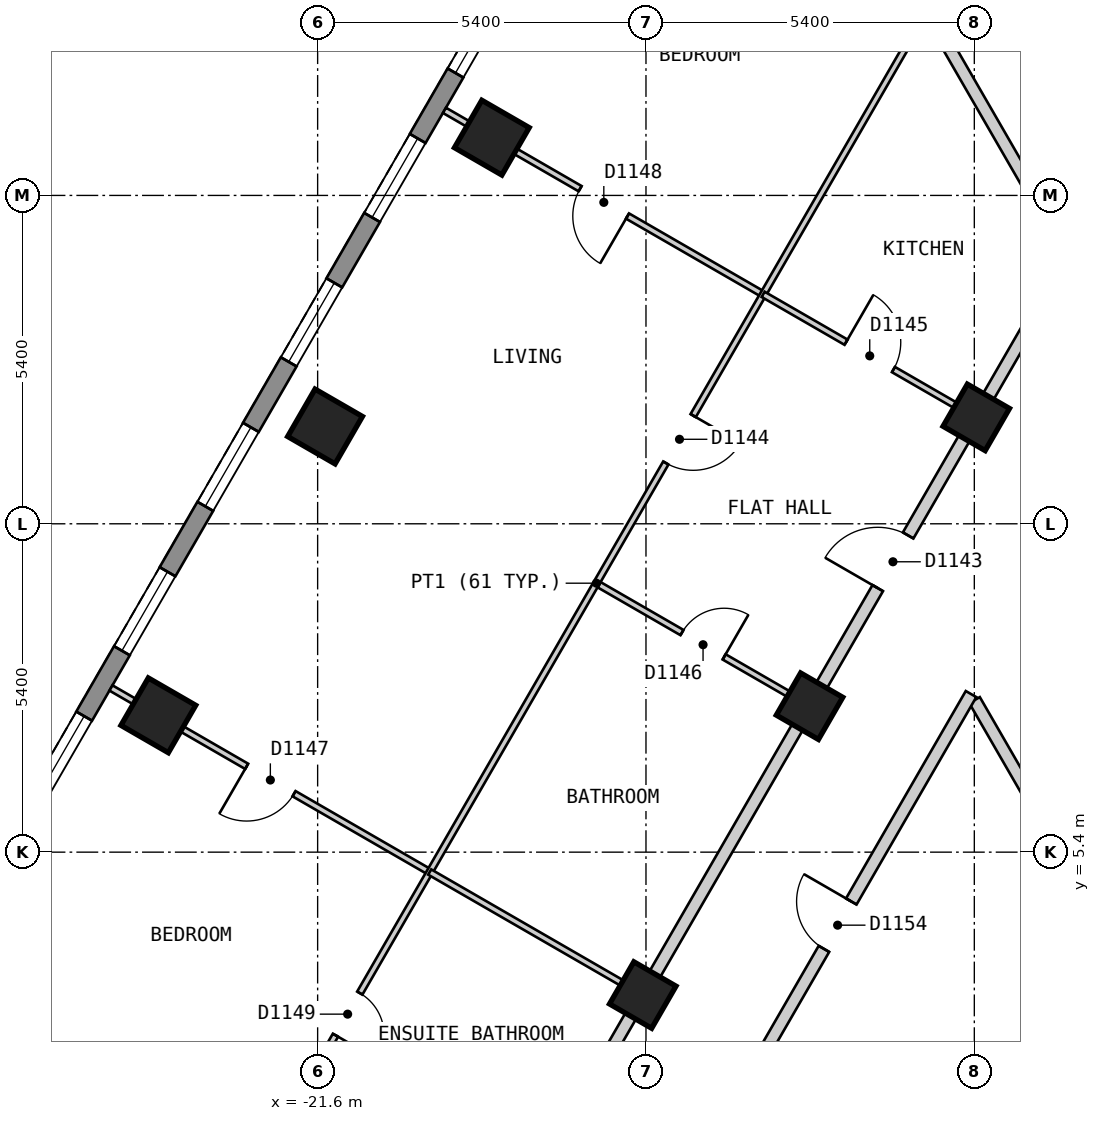
"""IFC4 building model, lengths in metres.
Left out: names, types, materials, properties, quantities, classifications, styles, units other than length and angle.
Written with IfcOpenShell. Run it as: python <this file> out.ifc"""

import sys

from ifc_helpers import new_model, si_unit, direction, frame, frame_2d, origin, origin_2d, place, context, subcontext, project, spatial, polyline, rectangle, outline, extrude, element, fill, save


model = new_model("IFC4")
c1 = context("Model", 3, precision=1e-05, world=origin(), true_north=direction((0.0, 1.0)))
c2 = subcontext(c1, "Body", "Model", "MODEL_VIEW")
j1 = project(units=[si_unit("LENGTHUNIT", "METRE"), si_unit("PLANEANGLEUNIT", "RADIAN")], contexts=[c1])
p1 = place(None, origin())
s1 = spatial("IfcSite", under=j1, at=p1, CompositionType="ELEMENT")
p2 = place(p1, origin())
s2 = spatial("IfcBuilding", under=s1, at=p2, CompositionType="ELEMENT")
p3 = place(p2, frame((0.0, 0.0, 150.6)))
s3 = spatial("IfcBuildingStorey", under=s2, at=p3, CompositionType="ELEMENT", Elevation=150.6)
for number, where, z_axis, x_axis in (
    (1, (-18.735, 17.15, 0.0), (0.0, 0.0, 1.0), (-0.5, -0.866, 0.0)),
    (2, (-21.478, 12.4, 0.0), (0.0, 0.0, 1.0), (-0.5, -0.866, 0.0)),
    (3, (-24.22, 7.65, 0.0), (0.0, 0.0, 1.0), (-0.5, -0.866, 0.0)),
):
    element("IfcColumn", number, at=place(p3, frame(where, z_axis=z_axis, x_axis=x_axis)), inside=s3, PredefinedType="COLUMN", context=c2, shape_type="SweptSolid", body=[
        extrude(rectangle(XDim=0.9, YDim=0.9, at=origin_2d()), origin(), (0.0, 0.0, 1.0), 3.0),
    ])
for number, where, z_axis, x_axis in (
    (4, (-10.768, 12.55, 0.0), (0.0, 0.0, 1.0), (-0.5, -0.866, 0.0)),
    (5, (-13.51, 7.8, 0.0), (0.0, 0.0, 1.0), (-0.5, -0.866, 0.0)),
    (6, (-16.253, 3.05, 0.0), (0.0, 0.0, 1.0), (-0.5, -0.866, 0.0)),
):
    element("IfcColumn", number, at=place(p3, frame(where, z_axis=z_axis, x_axis=x_axis)), inside=s3, PredefinedType="COLUMN", context=c2, shape_type="SweptSolid", body=[
        extrude(rectangle(XDim=0.8, YDim=0.8, at=origin_2d()), origin(), (0.0, 0.0, 1.0), 3.0),
    ])
p4 = place(p3, frame((-16.555, 23.025, 0.0), z_axis=(0.0, 0.0, 1.0), x_axis=(-0.500020536353, -0.866013546791, 0.0)))
e7 = element("IfcWall", 7, at=p4, inside=s3, PredefinedType="SOLIDWALL", context=c2, shape_type="SweptSolid", body=[
    extrude(outline(polyline([(0.0, -0.15), (23.325, -0.15), (23.245, 0.15), (0.08, 0.15), (0.0, -0.15)])), origin(), (0.0, 0.0, 1.0), 2.6),
])
p5 = place(p4, frame((1.314, 0.0, 0.15)))
e8 = element("IfcOpeningElement", 8, at=p5, cuts=e7, PredefinedType="OPENING", context=c2, shape_type="SweptSolid", body=[
    extrude(rectangle(XDim=1.5, YDim=2.1, at=frame_2d((0.75, 1.05))), frame((0.0, 0.16, 0.0), z_axis=(0.0, -1.0, 0.0), x_axis=(1.0, 0.0, 0.0)), (0.0, 0.0, 1.0), 0.32),
])
p6 = place(p4, frame((4.056, 0.0, 0.15)))
e9 = element("IfcOpeningElement", 9, at=p6, cuts=e7, PredefinedType="OPENING", context=c2, shape_type="SweptSolid", body=[
    extrude(rectangle(XDim=1.5, YDim=2.1, at=frame_2d((0.75, 1.05))), frame((0.0, 0.16, 0.0), z_axis=(0.0, -1.0, 0.0), x_axis=(1.0, 0.0, 0.0)), (0.0, 0.0, 1.0), 0.32),
])
p7 = place(p4, frame((6.799, 0.0, 0.15)))
e10 = element("IfcOpeningElement", 10, at=p7, cuts=e7, PredefinedType="OPENING", context=c2, shape_type="SweptSolid", body=[
    extrude(rectangle(XDim=1.5, YDim=2.1, at=frame_2d((0.75, 1.05))), frame((0.0, 0.16, 0.0), z_axis=(0.0, -1.0, 0.0), x_axis=(1.0, 0.0, 0.0)), (0.0, 0.0, 1.0), 0.32),
])
p8 = place(p4, frame((9.541, 0.0, 0.15)))
e11 = element("IfcOpeningElement", 11, at=p8, cuts=e7, PredefinedType="OPENING", context=c2, shape_type="SweptSolid", body=[
    extrude(rectangle(XDim=1.5, YDim=2.1, at=frame_2d((0.75, 1.05))), frame((0.0, 0.16, 0.0), z_axis=(0.0, -1.0, 0.0), x_axis=(1.0, 0.0, 0.0)), (0.0, 0.0, 1.0), 0.32),
])
p9 = place(p4, frame((12.285, 0.0, 0.15)))
e12 = element("IfcOpeningElement", 12, at=p9, cuts=e7, PredefinedType="OPENING", context=c2, shape_type="SweptSolid", body=[
    extrude(rectangle(XDim=1.5, YDim=2.1, at=frame_2d((0.75, 1.05))), frame((0.0, 0.16, 0.0), z_axis=(0.0, -1.0, 0.0), x_axis=(1.0, 0.0, 0.0)), (0.0, 0.0, 1.0), 0.32),
])
p10 = place(p4, frame((15.027, 0.0, 0.15)))
e13 = element("IfcOpeningElement", 13, at=p10, cuts=e7, PredefinedType="OPENING", context=c2, shape_type="SweptSolid", body=[
    extrude(rectangle(XDim=1.5, YDim=2.1, at=frame_2d((0.75, 1.05))), frame((0.0, 0.16, 0.0), z_axis=(0.0, -1.0, 0.0), x_axis=(1.0, 0.0, 0.0)), (0.0, 0.0, 1.0), 0.32),
])
p11 = place(p4, frame((17.769, 0.0, 0.15)))
e14 = element("IfcOpeningElement", 14, at=p11, cuts=e7, PredefinedType="OPENING", context=c2, shape_type="SweptSolid", body=[
    extrude(rectangle(XDim=1.5, YDim=2.1, at=frame_2d((0.75, 1.05))), frame((0.0, 0.16, 0.0), z_axis=(0.0, -1.0, 0.0), x_axis=(1.0, 0.0, 0.0)), (0.0, 0.0, 1.0), 0.32),
])
p12 = place(p4, frame((20.512, 0.0, 0.15)))
e15 = element("IfcOpeningElement", 15, at=p12, cuts=e7, PredefinedType="OPENING", context=c2, shape_type="SweptSolid", body=[
    extrude(rectangle(XDim=1.5, YDim=2.1, at=frame_2d((0.75, 1.05))), frame((0.0, 0.16, 0.0), z_axis=(0.0, -1.0, 0.0), x_axis=(1.0, 0.0, 0.0)), (0.0, 0.0, 1.0), 0.32),
])
p13 = place(p3, frame((-10.796, 7.9, 0.0), z_axis=(0.0, 0.0, 1.0), x_axis=(0.499954271211, -0.866051803703, 0.0)))
e16 = element("IfcWall", 16, at=p13, inside=s3, PredefinedType="PARTITIONING", context=c2, shape_type="SweptSolid", body=[
    extrude(rectangle(XDim=7.536, YDim=0.2, at=frame_2d((3.768, 0.0))), origin(), (0.0, 0.0, 1.0), 2.6),
])
p14 = place(p3, frame((-15.242, 0.399, 0.0), z_axis=(0.0, 0.0, 1.0), x_axis=(0.499953615651, 0.866052182145, 0.0)))
e17 = element("IfcWall", 17, at=p14, inside=s3, PredefinedType="PARTITIONING", context=c2, shape_type="SweptSolid", body=[
    extrude(rectangle(XDim=8.777, YDim=0.2, at=frame_2d((4.388, 0.0))), origin(), (0.0, 0.0, 1.0), 2.6),
])
p15 = place(p14, frame((3.938, 0.0, 0.0)))
e18 = element("IfcOpeningElement", 18, at=p15, cuts=e17, PredefinedType="OPENING", context=c2, shape_type="SweptSolid", body=[
    extrude(rectangle(XDim=0.9, YDim=2.1, at=frame_2d((0.45, 1.05))), frame((0.0, 0.11, 0.0), z_axis=(0.0, -1.0, 0.0), x_axis=(1.0, 0.0, 0.0)), (0.0, 0.0, 1.0), 0.22),
])
p16 = place(p3, frame((-17.724, 0.5, 0.0), z_axis=(0.0, 0.0, 1.0), x_axis=(0.499992388462, 0.866029798263, 0.0)))
e19 = element("IfcWall", 19, at=p16, inside=s3, PredefinedType="PARTITIONING", context=c2, shape_type="SweptSolid", body=[
    extrude(rectangle(XDim=16.859, YDim=0.2, at=frame_2d((8.429, 0.0))), origin(), (0.0, 0.0, 1.0), 2.6),
])
p17 = place(p16, frame((10.672, 0.0, 0.0)))
e20 = element("IfcOpeningElement", 20, at=p17, cuts=e19, PredefinedType="OPENING", context=c2, shape_type="SweptSolid", body=[
    extrude(rectangle(XDim=1.0, YDim=2.1, at=frame_2d((0.5, 1.05))), frame((0.0, 0.11, 0.0), z_axis=(0.0, -1.0, 0.0), x_axis=(1.0, 0.0, 0.0)), (0.0, 0.0, 1.0), 0.22),
])
p18 = place(p3, frame((-24.999, 8.1, 0.0), z_axis=(0.0, 0.0, 1.0), x_axis=(0.865978029808, -0.500082045158, 0.0)))
e21 = element("IfcWall", 21, at=p18, inside=s3, PredefinedType="PARTITIONING", context=c2, shape_type="SweptSolid", body=[
    extrude(rectangle(XDim=6.053, YDim=0.1, at=frame_2d((3.027, 0.0))), origin(), (0.0, 0.0, 1.0), 2.6),
])
p19 = place(p18, frame((2.577, 0.0, 0.0)))
e22 = element("IfcOpeningElement", 22, at=p19, cuts=e21, PredefinedType="OPENING", context=c2, shape_type="SweptSolid", body=[
    extrude(rectangle(XDim=0.9, YDim=2.1, at=frame_2d((0.45, 1.05))), frame((0.0, 0.06, 0.0), z_axis=(0.0, -1.0, 0.0), x_axis=(1.0, 0.0, 0.0)), (0.0, 0.0, 1.0), 0.12),
])
p20 = place(p3, frame((-16.971, 9.798, 0.0), z_axis=(0.0, 0.0, 1.0), x_axis=(0.866087525071, -0.499892387336, 0.0)))
e23 = element("IfcWall", 23, at=p20, inside=s3, PredefinedType="PARTITIONING", context=c2, shape_type="SweptSolid", body=[
    extrude(rectangle(XDim=3.897, YDim=0.1, at=frame_2d((1.948, 0.0))), origin(), (0.0, 0.0, 1.0), 2.6),
])
p21 = place(p20, frame((1.574, 0.0, 0.0)))
e24 = element("IfcOpeningElement", 24, at=p21, cuts=e23, PredefinedType="OPENING", context=c2, shape_type="SweptSolid", body=[
    extrude(rectangle(XDim=0.8, YDim=2.1, at=frame_2d((0.4, 1.05))), frame((0.0, 0.06, 0.0), z_axis=(0.0, -1.0, 0.0), x_axis=(1.0, 0.0, 0.0)), (0.0, 0.0, 1.0), 0.12),
])
p22 = place(p3, frame((-19.514, 17.599, 0.0), z_axis=(0.0, 0.0, 1.0), x_axis=(0.866007554612, -0.500030914399, 0.0)))
e25 = element("IfcWall", 25, at=p22, inside=s3, PredefinedType="PARTITIONING", context=c2, shape_type="SweptSolid", body=[
    extrude(rectangle(XDim=6.052, YDim=0.1, at=frame_2d((3.026, 0.0))), origin(), (0.0, 0.0, 1.0), 2.6),
])
p23 = place(p22, frame((2.576, 0.0, 0.0)))
e26 = element("IfcOpeningElement", 26, at=p23, cuts=e25, PredefinedType="OPENING", context=c2, shape_type="SweptSolid", body=[
    extrude(rectangle(XDim=0.9, YDim=2.1, at=frame_2d((0.45, 1.05))), frame((0.0, 0.06, 0.0), z_axis=(0.0, -1.0, 0.0), x_axis=(1.0, 0.0, 0.0)), (0.0, 0.0, 1.0), 0.12),
])
p24 = place(p3, frame((-22.398, 0.499, 0.0), z_axis=(0.0, 0.0, 1.0), x_axis=(0.499981561717, 0.866036048871, 0.0)))
e27 = element("IfcWall", 27, at=p24, inside=s3, PredefinedType="PARTITIONING", context=c2, shape_type="SweptSolid", body=[
    extrude(rectangle(XDim=21.532, YDim=0.1, at=frame_2d((10.766, 0.0))), origin(), (0.0, 0.0, 1.0), 2.6),
])
p25 = place(p24, frame((13.049, 0.0, 0.0)))
e28 = element("IfcOpeningElement", 28, at=p25, cuts=e27, PredefinedType="OPENING", context=c2, shape_type="SweptSolid", body=[
    extrude(rectangle(XDim=0.9, YDim=2.1, at=frame_2d((0.45, 1.05))), frame((0.0, 0.06, 0.0), z_axis=(0.0, -1.0, 0.0), x_axis=(1.0, 0.0, 0.0)), (0.0, 0.0, 1.0), 0.12),
])
p26 = place(p24, frame((2.183, 0.0, 0.0)))
e29 = element("IfcOpeningElement", 29, at=p26, cuts=e27, PredefinedType="OPENING", context=c2, shape_type="SweptSolid", body=[
    extrude(rectangle(XDim=0.8, YDim=2.1, at=frame_2d((0.4, 1.05))), frame((0.0, 0.06, 0.0), z_axis=(0.0, -1.0, 0.0), x_axis=(1.0, 0.0, 0.0)), (0.0, 0.0, 1.0), 0.12),
])
p27 = place(p3, frame((-11.52, 19.155, 0.0), z_axis=(0.0, 0.0, 1.0), x_axis=(0.499916824138, -0.866073420066, 0.0)))
e30 = element("IfcWall", 30, at=p27, inside=s3, PredefinedType="PARTITIONING", context=c2, shape_type="SweptSolid", body=[
    extrude(rectangle(XDim=4.567, YDim=0.2, at=frame_2d((2.283, 0.0))), origin(), (0.0, 0.0, 1.0), 2.6),
])
p28 = place(p3, frame((-19.757, 5.073, 0.0), z_axis=(0.0, 0.0, 1.0), x_axis=(0.866076396086, -0.499911668341, 0.0)))
e31 = element("IfcWall", 31, at=p28, inside=s3, PredefinedType="PARTITIONING", context=c2, shape_type="SweptSolid", body=[
    extrude(rectangle(XDim=3.947, YDim=0.1, at=frame_2d((1.973, 0.0))), origin(), (0.0, 0.0, 1.0), 2.6),
])
p29 = place(p3, frame((-14.273, 14.573, 0.0), z_axis=(0.0, 0.0, 1.0), x_axis=(0.866138216955, -0.499804550929, 0.0)))
e32 = element("IfcWall", 32, at=p29, inside=s3, PredefinedType="PARTITIONING", context=c2, shape_type="SweptSolid", body=[
    extrude(rectangle(XDim=3.947, YDim=0.1, at=frame_2d((1.974, 0.0))), origin(), (0.0, 0.0, 1.0), 2.6),
])
p30 = place(p29, frame((1.574, 0.0, 0.0)))
e33 = element("IfcOpeningElement", 33, at=p30, cuts=e32, PredefinedType="OPENING", context=c2, shape_type="SweptSolid", body=[
    extrude(rectangle(XDim=0.9, YDim=2.1, at=frame_2d((0.45, 1.05))), frame((0.0, 0.06, 0.0), z_axis=(0.0, -1.0, 0.0), x_axis=(1.0, 0.0, 0.0)), (0.0, 0.0, 1.0), 0.12),
])
p31 = place(p6, origin())
e34 = element("IfcWindow", 34, at=p31, inside=s3, PartitioningType="SINGLE_PANEL", PredefinedType="WINDOW", context=c2, shape_type="SweptSolid", body=[
    extrude(rectangle(XDim=1.5, YDim=2.1, at=frame_2d((0.75, 1.05))), frame((0.0, 0.03, 0.0), z_axis=(0.0, -1.0, 0.0), x_axis=(1.0, 0.0, 0.0)), (0.0, 0.0, 1.0), 0.06),
])
fill(e9, e34)
p32 = place(p7, origin())
e35 = element("IfcWindow", 35, at=p32, inside=s3, PartitioningType="SINGLE_PANEL", PredefinedType="WINDOW", context=c2, shape_type="SweptSolid", body=[
    extrude(rectangle(XDim=1.5, YDim=2.1, at=frame_2d((0.75, 1.05))), frame((0.0, 0.03, 0.0), z_axis=(0.0, -1.0, 0.0), x_axis=(1.0, 0.0, 0.0)), (0.0, 0.0, 1.0), 0.06),
])
fill(e10, e35)
p33 = place(p8, origin())
e36 = element("IfcWindow", 36, at=p33, inside=s3, PartitioningType="SINGLE_PANEL", PredefinedType="WINDOW", context=c2, shape_type="SweptSolid", body=[
    extrude(rectangle(XDim=1.5, YDim=2.1, at=frame_2d((0.75, 1.05))), frame((0.0, 0.03, 0.0), z_axis=(0.0, -1.0, 0.0), x_axis=(1.0, 0.0, 0.0)), (0.0, 0.0, 1.0), 0.06),
])
fill(e11, e36)
p34 = place(p9, origin())
e37 = element("IfcWindow", 37, at=p34, inside=s3, PartitioningType="SINGLE_PANEL", PredefinedType="WINDOW", context=c2, shape_type="SweptSolid", body=[
    extrude(rectangle(XDim=1.5, YDim=2.1, at=frame_2d((0.75, 1.05))), frame((0.0, 0.03, 0.0), z_axis=(0.0, -1.0, 0.0), x_axis=(1.0, 0.0, 0.0)), (0.0, 0.0, 1.0), 0.06),
])
fill(e12, e37)
p35 = place(p10, origin())
e38 = element("IfcWindow", 38, at=p35, inside=s3, PartitioningType="SINGLE_PANEL", PredefinedType="WINDOW", context=c2, shape_type="SweptSolid", body=[
    extrude(rectangle(XDim=1.5, YDim=2.1, at=frame_2d((0.75, 1.05))), frame((0.0, 0.03, 0.0), z_axis=(0.0, -1.0, 0.0), x_axis=(1.0, 0.0, 0.0)), (0.0, 0.0, 1.0), 0.06),
])
fill(e13, e38)
p36 = place(p11, origin())
e39 = element("IfcWindow", 39, at=p36, inside=s3, PartitioningType="SINGLE_PANEL", PredefinedType="WINDOW", context=c2, shape_type="SweptSolid", body=[
    extrude(rectangle(XDim=1.5, YDim=2.1, at=frame_2d((0.75, 1.05))), frame((0.0, 0.03, 0.0), z_axis=(0.0, -1.0, 0.0), x_axis=(1.0, 0.0, 0.0)), (0.0, 0.0, 1.0), 0.06),
])
fill(e14, e39)
p37 = place(p17, origin())
e40 = element("IfcDoor", 40, at=p37, inside=s3, OperationType="SINGLE_SWING_LEFT", PredefinedType="DOOR", context=c2, shape_type="SweptSolid", body=[
    extrude(rectangle(XDim=1.0, YDim=2.1, at=frame_2d((0.5, 1.05))), frame((0.0, 0.025, 0.0), z_axis=(0.0, -1.0, 0.0), x_axis=(1.0, 0.0, 0.0)), (0.0, 0.0, 1.0), 0.05),
])
fill(e20, e40)
p38 = place(p25, origin())
e41 = element("IfcDoor", 41, at=p38, inside=s3, OperationType="SINGLE_SWING_RIGHT", PredefinedType="DOOR", context=c2, shape_type="SweptSolid", body=[
    extrude(rectangle(XDim=0.9, YDim=2.1, at=frame_2d((0.45, 1.05))), frame((0.0, 0.025, 0.0), z_axis=(0.0, -1.0, 0.0), x_axis=(1.0, 0.0, 0.0)), (0.0, 0.0, 1.0), 0.05),
])
fill(e28, e41)
p39 = place(p30, origin())
e42 = element("IfcDoor", 42, at=p39, inside=s3, OperationType="SINGLE_SWING_LEFT", PredefinedType="DOOR", context=c2, shape_type="SweptSolid", body=[
    extrude(rectangle(XDim=0.9, YDim=2.1, at=frame_2d((0.45, 1.05))), frame((0.0, 0.025, 0.0), z_axis=(0.0, -1.0, 0.0), x_axis=(1.0, 0.0, 0.0)), (0.0, 0.0, 1.0), 0.05),
])
fill(e33, e42)
p40 = place(p21, origin())
e43 = element("IfcDoor", 43, at=p40, inside=s3, OperationType="SINGLE_SWING_RIGHT", PredefinedType="DOOR", context=c2, shape_type="SweptSolid", body=[
    extrude(rectangle(XDim=0.8, YDim=2.1, at=frame_2d((0.4, 1.05))), frame((0.0, 0.025, 0.0), z_axis=(0.0, -1.0, 0.0), x_axis=(1.0, 0.0, 0.0)), (0.0, 0.0, 1.0), 0.05),
])
fill(e24, e43)
p41 = place(p19, origin())
e44 = element("IfcDoor", 44, at=p41, inside=s3, OperationType="SINGLE_SWING_LEFT", PredefinedType="DOOR", context=c2, shape_type="SweptSolid", body=[
    extrude(rectangle(XDim=0.9, YDim=2.1, at=frame_2d((0.45, 1.05))), frame((0.0, 0.025, 0.0), z_axis=(0.0, -1.0, 0.0), x_axis=(1.0, 0.0, 0.0)), (0.0, 0.0, 1.0), 0.05),
])
fill(e22, e44)
p42 = place(p23, origin())
e45 = element("IfcDoor", 45, at=p42, inside=s3, OperationType="SINGLE_SWING_RIGHT", PredefinedType="DOOR", context=c2, shape_type="SweptSolid", body=[
    extrude(rectangle(XDim=0.9, YDim=2.1, at=frame_2d((0.45, 1.05))), frame((0.0, 0.025, 0.0), z_axis=(0.0, -1.0, 0.0), x_axis=(1.0, 0.0, 0.0)), (0.0, 0.0, 1.0), 0.05),
])
fill(e26, e45)
p43 = place(p26, origin())
e46 = element("IfcDoor", 46, at=p43, inside=s3, OperationType="SINGLE_SWING_LEFT", PredefinedType="DOOR", context=c2, shape_type="SweptSolid", body=[
    extrude(rectangle(XDim=0.8, YDim=2.1, at=frame_2d((0.4, 1.05))), frame((0.0, 0.025, 0.0), z_axis=(0.0, -1.0, 0.0), x_axis=(1.0, 0.0, 0.0)), (0.0, 0.0, 1.0), 0.05),
])
fill(e29, e46)
p44 = place(p15, origin())
e47 = element("IfcDoor", 47, at=p44, inside=s3, OperationType="SINGLE_SWING_RIGHT", PredefinedType="DOOR", context=c2, shape_type="SweptSolid", body=[
    extrude(rectangle(XDim=0.9, YDim=2.1, at=frame_2d((0.45, 1.05))), frame((0.0, 0.025, 0.0), z_axis=(0.0, -1.0, 0.0), x_axis=(1.0, 0.0, 0.0)), (0.0, 0.0, 1.0), 0.05),
])
fill(e18, e47)
save(model, sys.argv[1])
